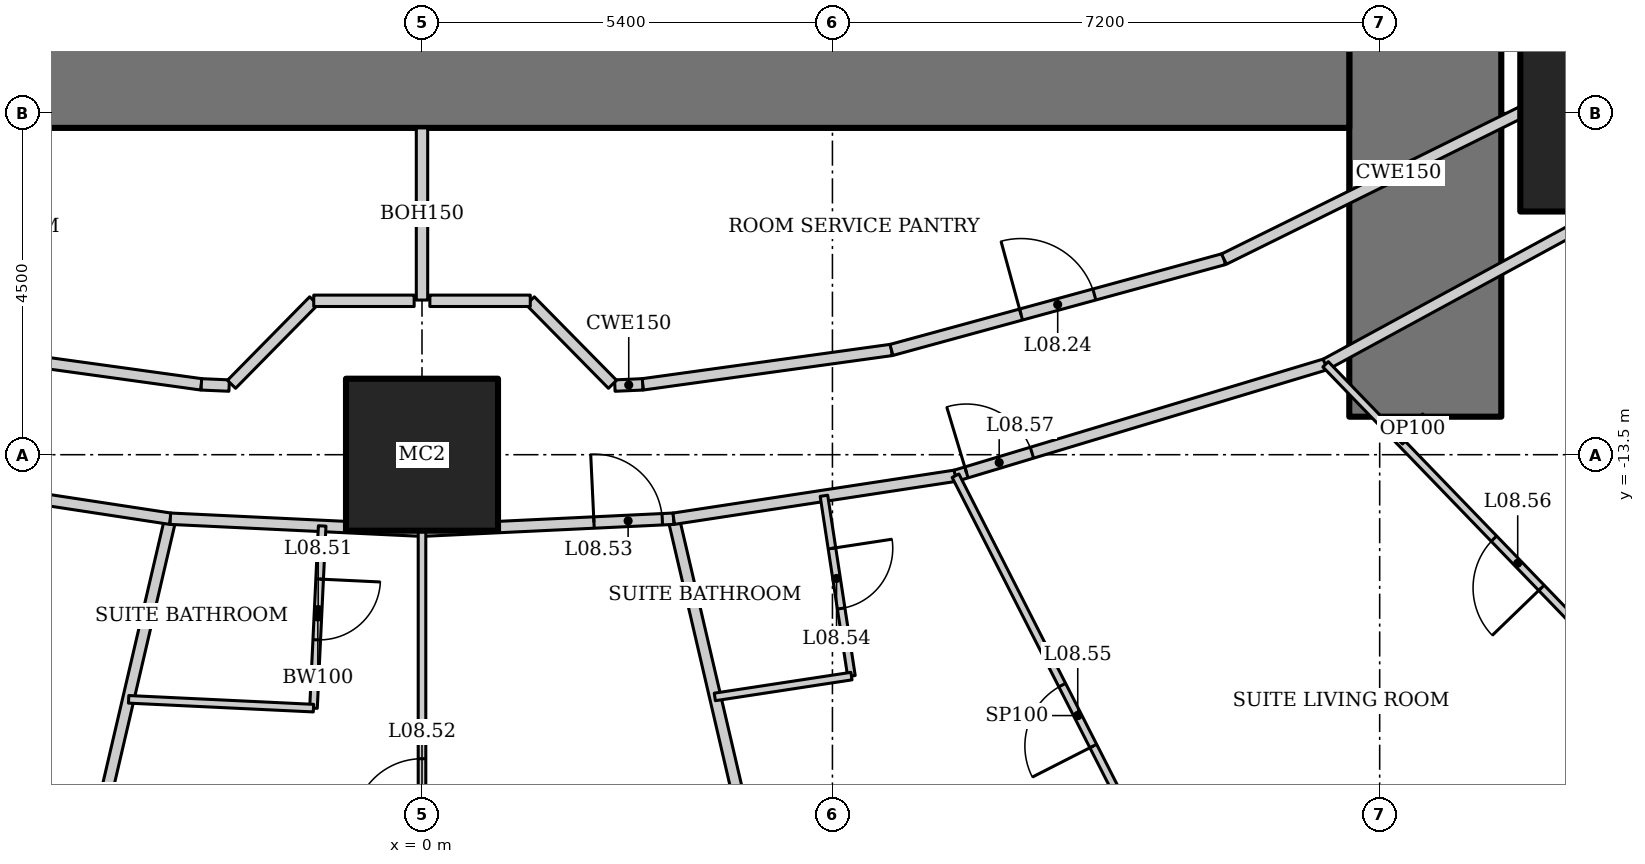
"""IFC4 building model, lengths in metres.
Left out: names, types, materials, properties, quantities, classifications, styles, units other than length and angle.
Written with IfcOpenShell. Run it as: python <this file> out.ifc"""

import sys

from ifc_helpers import new_model, si_unit, direction, frame, frame_2d, origin, origin_2d, place, context, subcontext, project, spatial, rectangle, hollow_rectangle, extrude, element, fill, save


model = new_model("IFC4")
c1 = context("Model", 3, precision=1e-05, world=origin(), true_north=direction((0.0, 1.0)))
c2 = subcontext(c1, "Body", "Model", "MODEL_VIEW")
j1 = project(units=[si_unit("LENGTHUNIT", "METRE"), si_unit("PLANEANGLEUNIT", "RADIAN")], contexts=[c1])
p1 = place(None, origin())
s1 = spatial("IfcSite", under=j1, at=p1, CompositionType="ELEMENT")
p2 = place(p1, origin())
s2 = spatial("IfcBuilding", under=s1, at=p2, CompositionType="ELEMENT")
p3 = place(p2, frame((0.0, 0.0, 44.2)))
s3 = spatial("IfcBuildingStorey", under=s2, at=p3, CompositionType="ELEMENT", Elevation=44.2)
p4 = place(p3, frame((0.0, -13.5, 0.0), z_axis=(0.0, 0.0, 1.0), x_axis=(1.0, 0.0, 0.0)))
e1 = element("IfcColumn", 1, at=p4, inside=s3, PredefinedType="COLUMN", context=c2, shape_type="SweptSolid", body=[
    extrude(hollow_rectangle(XDim=2.0, YDim=2.0, WallThickness=0.17, at=origin_2d()), origin(), (0.0, 0.0, 1.0), 3.6),
])
p5 = place(p3, frame((15.75, -9.0, 0.0), z_axis=(0.0, 0.0, 1.0), x_axis=(1.0, 0.0, 0.0)))
e2 = element("IfcColumn", 2, at=p5, inside=s3, PredefinedType="COLUMN", context=c2, shape_type="SweptSolid", body=[
    extrude(hollow_rectangle(XDim=2.6, YDim=2.6, WallThickness=0.13, at=origin_2d()), origin(), (0.0, 0.0, 1.0), 3.6),
])
p6 = place(p3, frame((13.2, -13.0, 0.0), z_axis=(0.0, 0.0, 1.0), x_axis=(0.0, 1.0, 0.0)))
e3 = element("IfcWall", 3, at=p6, inside=s3, PredefinedType="SHEAR", context=c2, shape_type="SweptSolid", body=[
    extrude(rectangle(XDim=26.0, YDim=2.0, at=frame_2d((13.0, 0.0))), origin(), (0.0, 0.0, 1.0), 3.6),
])
p7 = place(p6, frame((12.1, 0.0, 0.0)))
e4 = element("IfcOpeningElement", 4, at=p7, cuts=e3, PredefinedType="OPENING", context=c2, shape_type="SweptSolid", body=[
    extrude(rectangle(XDim=1.8, YDim=2.1, at=frame_2d((0.9, 1.05))), frame((0.0, 1.01, 0.0), z_axis=(0.0, -1.0, 0.0), x_axis=(1.0, 0.0, 0.0)), (0.0, 0.0, 1.0), 2.02),
])
p8 = place(p3, frame((-12.2, -8.0, 0.0), z_axis=(0.0, 0.0, 1.0), x_axis=(1.0, 0.0, 0.0)))
e5 = element("IfcWall", 5, at=p8, inside=s3, PredefinedType="SHEAR", context=c2, shape_type="SweptSolid", body=[
    extrude(rectangle(XDim=24.4, YDim=2.4, at=frame_2d((12.2, 0.0))), origin(), (0.0, 0.0, 1.0), 3.6),
])
for number, where, z_axis, x_axis in (
    (6, (-5.211, -22.496, 0.0), (0.0, 0.0, 1.0), (0.227, 0.974, 0.0)),
    (7, (5.211, -22.496, 0.0), (0.0, 0.0, 1.0), (-0.227, 0.974, 0.0)),
):
    element("IfcWall", number, at=place(p3, frame(where, z_axis=z_axis, x_axis=x_axis)), inside=s3, PredefinedType="PARTITIONING", context=c2, shape_type="SweptSolid", body=[
        extrude(rectangle(XDim=8.372, YDim=0.15, at=frame_2d((4.186, 0.0))), origin(), (0.0, 0.0, 1.0), 2.767),
    ])
p9 = place(p3, frame((-7.019, -13.776, 0.0), z_axis=(0.0, 0.0, 1.0), x_axis=(0.988564270062, -0.150800145746, 0.0)))
e8 = element("IfcWall", 8, at=p9, inside=s3, PredefinedType="PARTITIONING", context=c2, shape_type="SweptSolid", body=[
    extrude(rectangle(XDim=3.751, YDim=0.15, at=frame_2d((1.875, 0.0))), origin(), (0.0, 0.0, 1.0), 3.45),
])
p10 = place(p3, frame((-3.311, -14.342, 0.0), z_axis=(0.0, 0.0, 1.0), x_axis=(0.998863968075, -0.047652631422, 0.0)))
e9 = element("IfcWall", 9, at=p10, inside=s3, PredefinedType="PARTITIONING", context=c2, shape_type="SweptSolid", body=[
    extrude(rectangle(XDim=3.315, YDim=0.15, at=frame_2d((1.657, 0.0))), origin(), (0.0, 0.0, 1.0), 3.45),
])
p11 = place(p3, frame((0.0, -14.5, 0.0), z_axis=(0.0, 0.0, 1.0), x_axis=(0.998863968075, 0.047652631422, 0.0)))
e10 = element("IfcWall", 10, at=p11, inside=s3, PredefinedType="PARTITIONING", context=c2, shape_type="SweptSolid", body=[
    extrude(rectangle(XDim=3.315, YDim=0.15, at=frame_2d((1.657, 0.0))), origin(), (0.0, 0.0, 1.0), 3.45),
])
p12 = place(p11, frame((2.265, 0.0, 0.0)))
e11 = element("IfcOpeningElement", 11, at=p12, cuts=e10, PredefinedType="OPENING", context=c2, shape_type="SweptSolid", body=[
    extrude(rectangle(XDim=0.9, YDim=2.1, at=frame_2d((0.45, 1.05))), frame((0.0, 0.085, 0.0), z_axis=(0.0, -1.0, 0.0), x_axis=(1.0, 0.0, 0.0)), (0.0, 0.0, 1.0), 0.17),
])
p13 = place(p3, frame((3.311, -14.342, 0.0), z_axis=(0.0, 0.0, 1.0), x_axis=(0.988564270062, 0.150800145746, 0.0)))
e12 = element("IfcWall", 12, at=p13, inside=s3, PredefinedType="PARTITIONING", context=c2, shape_type="SweptSolid", body=[
    extrude(rectangle(XDim=3.751, YDim=0.15, at=frame_2d((1.875, 0.0))), origin(), (0.0, 0.0, 1.0), 3.45),
])
p14 = place(p3, frame((7.019, -13.776, 0.0), z_axis=(0.0, 0.0, 1.0), x_axis=(0.957564241242, 0.288219922793, 0.0)))
e13 = element("IfcWall", 13, at=p14, inside=s3, PredefinedType="PARTITIONING", context=c2, shape_type="SweptSolid", body=[
    extrude(rectangle(XDim=5.085, YDim=0.15, at=frame_2d((2.542, 0.0))), origin(), (0.0, 0.0, 1.0), 3.45),
])
p15 = place(p14, frame((0.15, 0.0, 0.0)))
e14 = element("IfcOpeningElement", 14, at=p15, cuts=e13, PredefinedType="OPENING", context=c2, shape_type="SweptSolid", body=[
    extrude(rectangle(XDim=0.9, YDim=2.1, at=frame_2d((0.45, 1.05))), frame((0.0, 0.085, 0.0), z_axis=(0.0, -1.0, 0.0), x_axis=(1.0, 0.0, 0.0)), (0.0, 0.0, 1.0), 0.17),
])
p16 = place(p3, frame((11.888, -12.311, 0.0), z_axis=(0.0, 0.0, 1.0), x_axis=(0.878450059298, 0.477834169267, 0.0)))
e15 = element("IfcWall", 15, at=p16, inside=s3, PredefinedType="PARTITIONING", context=c2, shape_type="SweptSolid", body=[
    extrude(rectangle(XDim=5.631, YDim=0.15, at=frame_2d((2.815, 0.0))), origin(), (0.0, 0.0, 1.0), 3.45),
])
for number, where, z_axis, x_axis in (
    (16, (-6.176, -12.122, 0.0), (0.0, 0.0, 1.0), (0.991, -0.137, 0.0)),
    (17, (2.903, -12.574, 0.0), (0.0, 0.0, 1.0), (0.991, 0.137, 0.0)),
):
    element("IfcWall", number, at=place(p3, frame(where, z_axis=z_axis, x_axis=x_axis)), inside=s3, PredefinedType="PARTITIONING", context=c2, shape_type="SweptSolid", body=[
        extrude(rectangle(XDim=3.304, YDim=0.15, at=frame_2d((1.652, 0.0))), origin(), (0.0, 0.0, 1.0), 3.45),
    ])
p17 = place(p3, frame((6.176, -12.122, 0.0), z_axis=(0.0, 0.0, 1.0), x_axis=(0.964644466646, 0.263554648923, 0.0)))
e18 = element("IfcWall", 18, at=p17, inside=s3, PredefinedType="PARTITIONING", context=c2, shape_type="SweptSolid", body=[
    extrude(rectangle(XDim=4.535, YDim=0.15, at=frame_2d((2.268, 0.0))), origin(), (0.0, 0.0, 1.0), 3.45),
])
p18 = place(p17, frame((1.768, 0.0, 0.0)))
e19 = element("IfcOpeningElement", 19, at=p18, cuts=e18, PredefinedType="OPENING", context=c2, shape_type="SweptSolid", body=[
    extrude(rectangle(XDim=1.0, YDim=2.1, at=frame_2d((0.5, 1.05))), frame((0.0, 0.085, 0.0), z_axis=(0.0, -1.0, 0.0), x_axis=(1.0, 0.0, 0.0)), (0.0, 0.0, 1.0), 0.17),
])
p19 = place(p3, frame((10.551, -10.926, 0.0), z_axis=(0.0, 0.0, 1.0), x_axis=(0.89656943448, 0.442903205177, 0.0)))
e20 = element("IfcWall", 20, at=p19, inside=s3, PredefinedType="PARTITIONING", context=c2, shape_type="SweptSolid", body=[
    extrude(rectangle(XDim=5.126, YDim=0.15, at=frame_2d((2.563, 0.0))), origin(), (0.0, 0.0, 1.0), 3.45),
])
p20 = place(p3, frame((-1.313, -14.438, 0.0), z_axis=(0.0, 0.0, 1.0), x_axis=(-0.047608648396, -0.998866065395, 0.0)))
e21 = element("IfcWall", 21, at=p20, inside=s3, PredefinedType="PARTITIONING", context=c2, shape_type="SweptSolid", body=[
    extrude(rectangle(XDim=2.4, YDim=0.1, at=frame_2d((1.2, 0.0))), origin(), (0.0, 0.0, 1.0), 3.45),
])
p21 = place(p20, frame((0.7, 0.0, 0.0)))
e22 = element("IfcOpeningElement", 22, at=p21, cuts=e21, PredefinedType="OPENING", context=c2, shape_type="SweptSolid", body=[
    extrude(rectangle(XDim=0.8, YDim=2.1, at=frame_2d((0.4, 1.05))), frame((0.0, 0.06, 0.0), z_axis=(0.0, -1.0, 0.0), x_axis=(1.0, 0.0, 0.0)), (0.0, 0.0, 1.0), 0.12),
])
p22 = place(p3, frame((-1.428, -16.835, 0.0), z_axis=(0.0, 0.0, 1.0), x_axis=(-0.998865186759, 0.047627079272, 0.0)))
e23 = element("IfcWall", 23, at=p22, inside=s3, PredefinedType="PARTITIONING", context=c2, shape_type="SweptSolid", body=[
    extrude(rectangle(XDim=2.435, YDim=0.1, at=frame_2d((1.217, 0.0))), origin(), (0.0, 0.0, 1.0), 3.45),
])
p23 = place(p3, frame((0.0, -21.4, 0.0), z_axis=(0.0, 0.0, 1.0), x_axis=(0.0, 1.0, 0.0)))
e24 = element("IfcWall", 24, at=p23, inside=s3, PredefinedType="PARTITIONING", context=c2, shape_type="SweptSolid", body=[
    extrude(rectangle(XDim=6.9, YDim=0.1, at=frame_2d((3.45, 0.0))), origin(), (0.0, 0.0, 1.0), 2.924),
])
p24 = place(p23, frame((3.0, 0.0, 0.0)))
e25 = element("IfcOpeningElement", 25, at=p24, cuts=e24, PredefinedType="OPENING", context=c2, shape_type="SweptSolid", body=[
    extrude(rectangle(XDim=0.9, YDim=2.1, at=frame_2d((0.45, 1.05))), frame((0.0, 0.06, 0.0), z_axis=(0.0, -1.0, 0.0), x_axis=(1.0, 0.0, 0.0)), (0.0, 0.0, 1.0), 0.12),
])
p25 = place(p3, frame((5.288, -14.041, 0.0), z_axis=(0.0, 0.0, 1.0), x_axis=(0.150757550564, -0.988570766788, 0.0)))
e26 = element("IfcWall", 26, at=p25, inside=s3, PredefinedType="PARTITIONING", context=c2, shape_type="SweptSolid", body=[
    extrude(rectangle(XDim=2.4, YDim=0.1, at=frame_2d((1.2, 0.0))), origin(), (0.0, 0.0, 1.0), 3.45),
])
p26 = place(p25, frame((0.7, 0.0, 0.0)))
e27 = element("IfcOpeningElement", 27, at=p26, cuts=e26, PredefinedType="OPENING", context=c2, shape_type="SweptSolid", body=[
    extrude(rectangle(XDim=0.8, YDim=2.1, at=frame_2d((0.4, 1.05))), frame((0.0, 0.06, 0.0), z_axis=(0.0, -1.0, 0.0), x_axis=(1.0, 0.0, 0.0)), (0.0, 0.0, 1.0), 0.12),
])
p27 = place(p3, frame((5.65, -16.413, 0.0), z_axis=(0.0, 0.0, 1.0), x_axis=(-0.988567991054, -0.150775750911, 0.0)))
e28 = element("IfcWall", 28, at=p27, inside=s3, PredefinedType="PARTITIONING", context=c2, shape_type="SweptSolid", body=[
    extrude(rectangle(XDim=1.818, YDim=0.1, at=frame_2d((0.909, 0.0))), origin(), (0.0, 0.0, 1.0), 3.45),
])
p28 = place(p3, frame((10.236, -20.088, 0.0), z_axis=(0.0, 0.0, 1.0), x_axis=(-0.454010445571, 0.890996360998, 0.0)))
e29 = element("IfcWall", 29, at=p28, inside=s3, PredefinedType="PARTITIONING", context=c2, shape_type="SweptSolid", body=[
    extrude(rectangle(XDim=7.084, YDim=0.1, at=frame_2d((3.542, 0.0))), origin(), (0.0, 0.0, 1.0), 2.528),
])
p29 = place(p28, frame((3.092, 0.0, 0.0)))
e30 = element("IfcOpeningElement", 30, at=p29, cuts=e29, PredefinedType="OPENING", context=c2, shape_type="SweptSolid", body=[
    extrude(rectangle(XDim=0.9, YDim=2.1, at=frame_2d((0.45, 1.05))), frame((0.0, 0.06, 0.0), z_axis=(0.0, -1.0, 0.0), x_axis=(1.0, 0.0, 0.0)), (0.0, 0.0, 1.0), 0.12),
])
p30 = place(p3, frame((16.944, -17.545, 0.0), z_axis=(0.0, 0.0, 1.0), x_axis=(-0.694669949151, 0.719328618746, 0.0)))
e31 = element("IfcWall", 31, at=p30, inside=s3, PredefinedType="PARTITIONING", context=c2, shape_type="SweptSolid", body=[
    extrude(rectangle(XDim=7.277, YDim=0.1, at=frame_2d((3.639, 0.0))), origin(), (0.0, 0.0, 1.0), 2.528),
])
p31 = place(p30, frame((3.189, 0.0, 0.0)))
e32 = element("IfcOpeningElement", 32, at=p31, cuts=e31, PredefinedType="OPENING", context=c2, shape_type="SweptSolid", body=[
    extrude(rectangle(XDim=0.9, YDim=2.1, at=frame_2d((0.45, 1.05))), frame((0.0, 0.06, 0.0), z_axis=(0.0, -1.0, 0.0), x_axis=(1.0, 0.0, 0.0)), (0.0, 0.0, 1.0), 0.12),
])
p32 = place(p3, frame((13.2, -13.0, 0.0), z_axis=(0.0, 0.0, 1.0), x_axis=(-0.719347134512, -0.69465077562, 0.0)))
e33 = element("IfcWall", 33, at=p32, inside=s3, PredefinedType="PARTITIONING", context=c2, shape_type="SweptSolid", body=[
    extrude(rectangle(XDim=0.465, YDim=0.1, at=frame_2d((0.232, 0.0))), origin(), (0.0, 0.0, 1.0), 3.45),
])
for number, where, z_axis, x_axis in (
    (34, (-2.903, -12.574, 0.0), (0.0, 0.0, 1.0), (0.999, -0.043, 0.0)),
    (35, (2.537, -12.59, 0.0), (0.0, 0.0, 1.0), (0.999, 0.043, 0.0)),
):
    element("IfcWall", number, at=place(p3, frame(where, z_axis=z_axis, x_axis=x_axis)), inside=s3, PredefinedType="PARTITIONING", context=c2, shape_type="SweptSolid", body=[
        extrude(rectangle(XDim=0.366, YDim=0.15, at=frame_2d((0.183, 0.0))), origin(), (0.0, 0.0, 1.0), 3.45),
    ])
p33 = place(p3, frame((0.0, -9.2, 0.0), z_axis=(0.0, 0.0, 1.0), x_axis=(0.0, -1.0, 0.0)))
e36 = element("IfcWall", 36, at=p33, inside=s3, PredefinedType="PARTITIONING", context=c2, shape_type="SweptSolid", body=[
    extrude(rectangle(XDim=2.265, YDim=0.15, at=frame_2d((1.133, 0.0))), origin(), (0.0, 0.0, 1.0), 3.044),
])
p34 = place(p3, frame((-2.506, -12.574, 0.0), z_axis=(0.0, 0.0, 1.0), x_axis=(0.701622806479, 0.712548550927, 0.0)))
e37 = element("IfcWall", 37, at=p34, inside=s3, PredefinedType="PARTITIONING", context=c2, shape_type="SweptSolid", body=[
    extrude(rectangle(XDim=1.542, YDim=0.15, at=frame_2d((0.771, 0.0))), origin(), (0.0, 0.0, 1.0), 3.45),
])
p35 = place(p3, frame((-1.425, -11.475, 0.0), z_axis=(0.0, 0.0, 1.0), x_axis=(1.0, 0.0, 0.0)))
e38 = element("IfcWall", 38, at=p35, inside=s3, PredefinedType="PARTITIONING", context=c2, shape_type="SweptSolid", body=[
    extrude(rectangle(XDim=1.321, YDim=0.15, at=frame_2d((0.661, 0.0))), origin(), (0.0, 0.0, 1.0), 3.45),
])
p36 = place(p3, frame((1.425, -11.475, 0.0), z_axis=(0.0, 0.0, 1.0), x_axis=(0.701622806479, -0.712548550927, 0.0)))
e39 = element("IfcWall", 39, at=p36, inside=s3, PredefinedType="PARTITIONING", context=c2, shape_type="SweptSolid", body=[
    extrude(rectangle(XDim=1.542, YDim=0.15, at=frame_2d((0.771, 0.0))), origin(), (0.0, 0.0, 1.0), 3.45),
])
p37 = place(p3, frame((0.103, -11.475, 0.0), z_axis=(0.0, 0.0, 1.0), x_axis=(1.0, 0.0, 0.0)))
e40 = element("IfcWall", 40, at=p37, inside=s3, PredefinedType="PARTITIONING", context=c2, shape_type="SweptSolid", body=[
    extrude(rectangle(XDim=1.321, YDim=0.15, at=frame_2d((0.661, 0.0))), origin(), (0.0, 0.0, 1.0), 3.45),
])
p38 = place(p18, origin())
e41 = element("IfcDoor", 41, at=p38, inside=s3, OperationType="SINGLE_SWING_LEFT", PredefinedType="DOOR", context=c2, shape_type="SweptSolid", body=[
    extrude(rectangle(XDim=1.0, YDim=2.1, at=frame_2d((0.5, 1.05))), frame((0.0, 0.025, 0.0), z_axis=(0.0, -1.0, 0.0), x_axis=(1.0, 0.0, 0.0)), (0.0, 0.0, 1.0), 0.05),
])
fill(e19, e41)
p39 = place(p21, origin())
e42 = element("IfcDoor", 42, at=p39, inside=s3, OperationType="SINGLE_SWING_LEFT", PredefinedType="DOOR", context=c2, shape_type="SweptSolid", body=[
    extrude(rectangle(XDim=0.8, YDim=2.1, at=frame_2d((0.4, 1.05))), frame((0.0, 0.025, 0.0), z_axis=(0.0, -1.0, 0.0), x_axis=(1.0, 0.0, 0.0)), (0.0, 0.0, 1.0), 0.05),
])
fill(e22, e42)
p40 = place(p24, origin())
e43 = element("IfcDoor", 43, at=p40, inside=s3, OperationType="SINGLE_SWING_LEFT", PredefinedType="DOOR", context=c2, shape_type="SweptSolid", body=[
    extrude(rectangle(XDim=0.9, YDim=2.1, at=frame_2d((0.45, 1.05))), frame((0.0, 0.025, 0.0), z_axis=(0.0, -1.0, 0.0), x_axis=(1.0, 0.0, 0.0)), (0.0, 0.0, 1.0), 0.05),
])
fill(e25, e43)
p41 = place(p12, origin())
e44 = element("IfcDoor", 44, at=p41, inside=s3, OperationType="SINGLE_SWING_LEFT", PredefinedType="DOOR", context=c2, shape_type="SweptSolid", body=[
    extrude(rectangle(XDim=0.9, YDim=2.1, at=frame_2d((0.45, 1.05))), frame((0.0, 0.025, 0.0), z_axis=(0.0, -1.0, 0.0), x_axis=(1.0, 0.0, 0.0)), (0.0, 0.0, 1.0), 0.05),
])
fill(e11, e44)
p42 = place(p26, origin())
e45 = element("IfcDoor", 45, at=p42, inside=s3, OperationType="SINGLE_SWING_LEFT", PredefinedType="DOOR", context=c2, shape_type="SweptSolid", body=[
    extrude(rectangle(XDim=0.8, YDim=2.1, at=frame_2d((0.4, 1.05))), frame((0.0, 0.025, 0.0), z_axis=(0.0, -1.0, 0.0), x_axis=(1.0, 0.0, 0.0)), (0.0, 0.0, 1.0), 0.05),
])
fill(e27, e45)
p43 = place(p29, origin())
e46 = element("IfcDoor", 46, at=p43, inside=s3, OperationType="SINGLE_SWING_LEFT", PredefinedType="DOOR", context=c2, shape_type="SweptSolid", body=[
    extrude(rectangle(XDim=0.9, YDim=2.1, at=frame_2d((0.45, 1.05))), frame((0.0, 0.025, 0.0), z_axis=(0.0, -1.0, 0.0), x_axis=(1.0, 0.0, 0.0)), (0.0, 0.0, 1.0), 0.05),
])
fill(e30, e46)
p44 = place(p31, origin())
e47 = element("IfcDoor", 47, at=p44, inside=s3, OperationType="SINGLE_SWING_LEFT", PredefinedType="DOOR", context=c2, shape_type="SweptSolid", body=[
    extrude(rectangle(XDim=0.9, YDim=2.1, at=frame_2d((0.45, 1.05))), frame((0.0, 0.025, 0.0), z_axis=(0.0, -1.0, 0.0), x_axis=(1.0, 0.0, 0.0)), (0.0, 0.0, 1.0), 0.05),
])
fill(e32, e47)
p45 = place(p15, origin())
e48 = element("IfcDoor", 48, at=p45, inside=s3, OperationType="SINGLE_SWING_LEFT", PredefinedType="DOOR", context=c2, shape_type="SweptSolid", body=[
    extrude(rectangle(XDim=0.9, YDim=2.1, at=frame_2d((0.45, 1.05))), frame((0.0, 0.025, 0.0), z_axis=(0.0, -1.0, 0.0), x_axis=(1.0, 0.0, 0.0)), (0.0, 0.0, 1.0), 0.05),
])
fill(e14, e48)
save(model, sys.argv[1])
